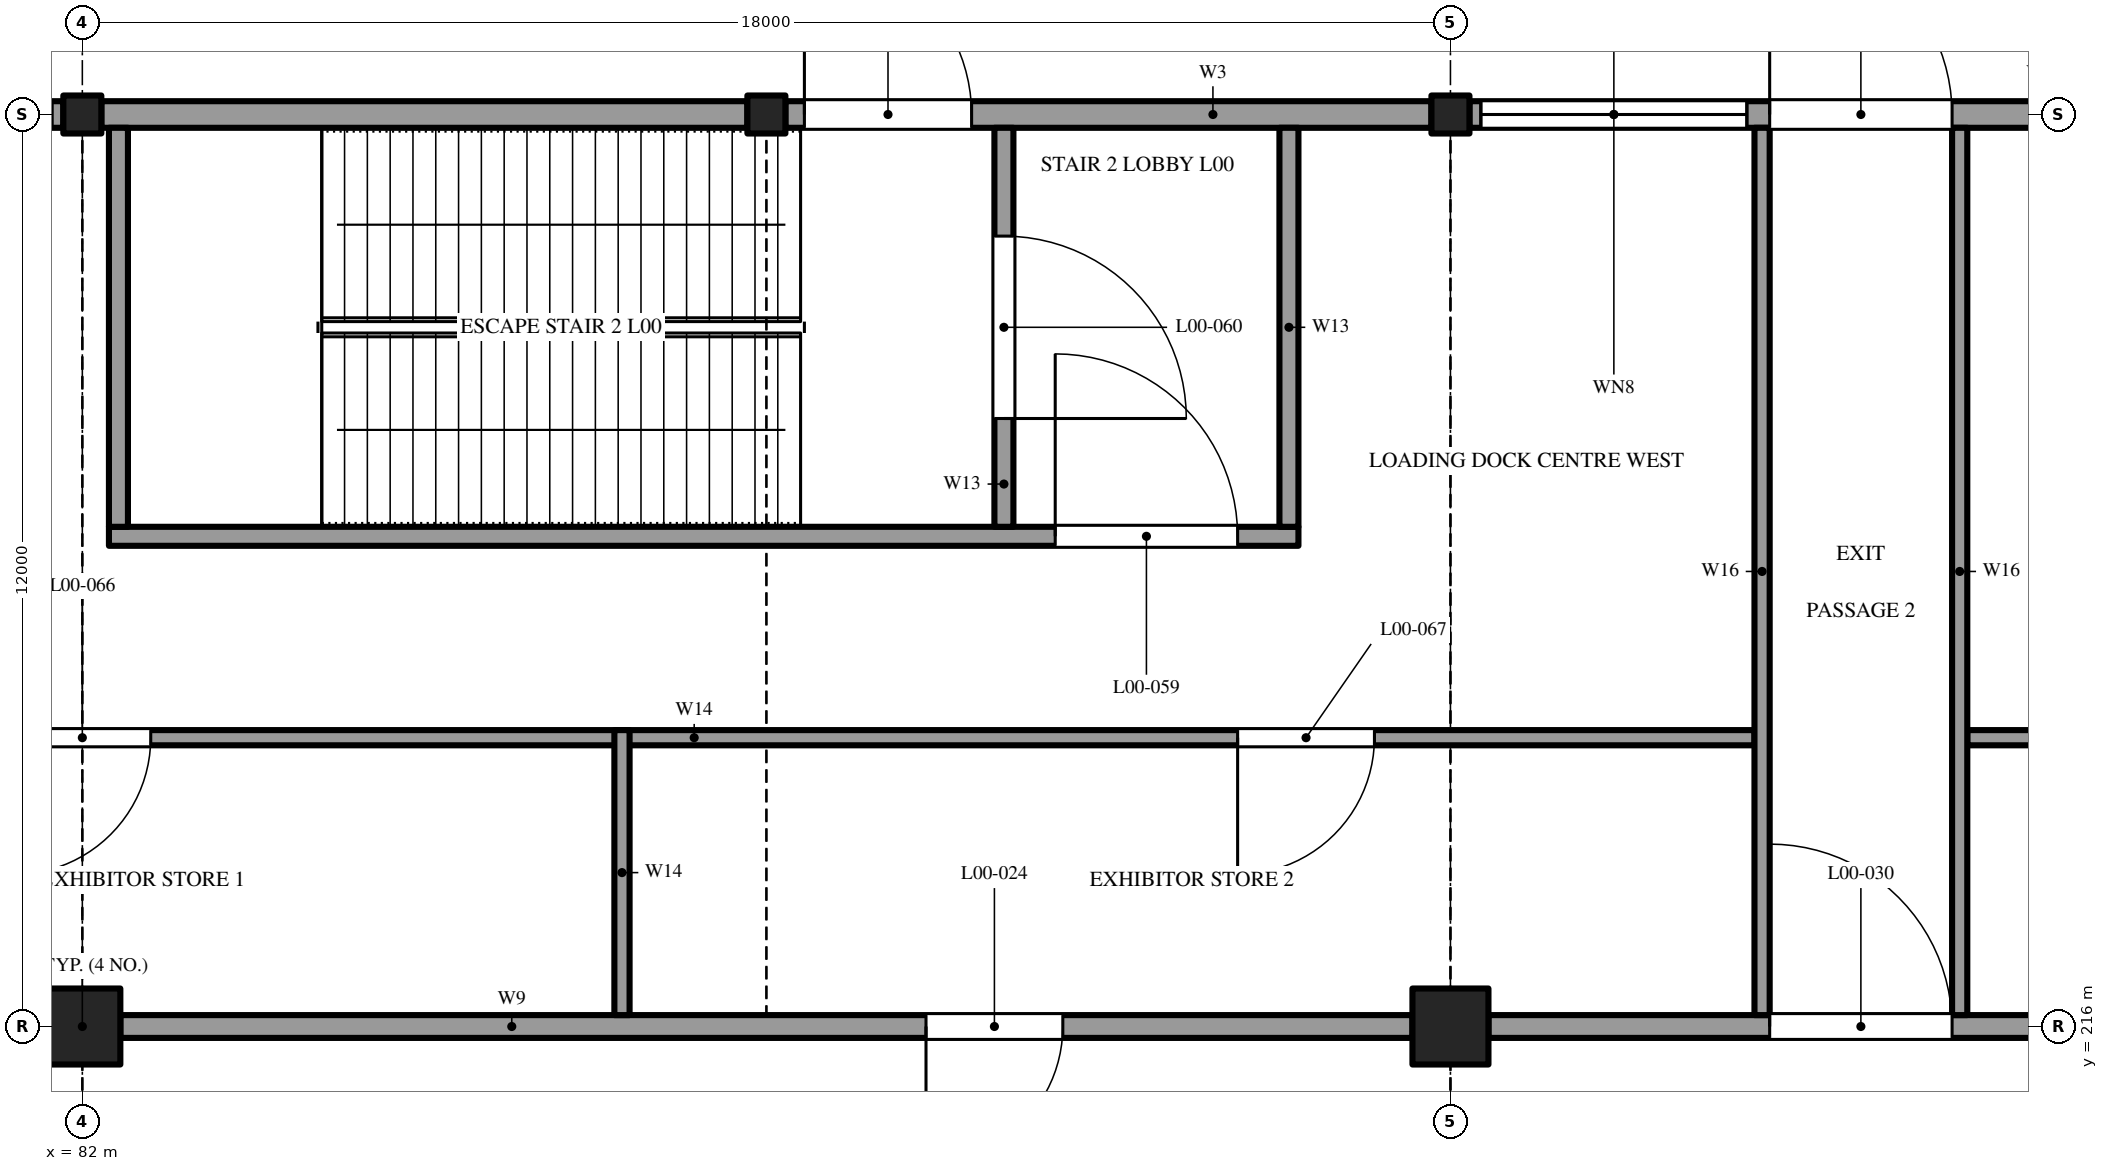
"""IFC4 building model, lengths in metres.
Left out: names, types, materials, properties, quantities, classifications, styles, units other than length and angle.
Written with IfcOpenShell. Run it as: python <this file> out.ifc"""

import sys

from ifc_helpers import new_model, si_unit, direction, frame, frame_2d, origin, origin_2d, place, context, subcontext, project, spatial, rectangle, extrude, element, fill, save


model = new_model("IFC4")
c1 = context("Model", 3, precision=1e-05, world=origin(), true_north=direction((0.0, 1.0)))
c2 = subcontext(c1, "Body", "Model", "MODEL_VIEW")
j1 = project(units=[si_unit("LENGTHUNIT", "METRE"), si_unit("PLANEANGLEUNIT", "RADIAN")], contexts=[c1])
p1 = place(None, origin())
s1 = spatial("IfcSite", under=j1, at=p1, CompositionType="ELEMENT")
p2 = place(p1, origin())
s2 = spatial("IfcBuilding", under=s1, at=p2, CompositionType="ELEMENT")
p3 = place(p2, origin())
s3 = spatial("IfcBuildingStorey", under=s2, at=p3, CompositionType="ELEMENT", Elevation=0.0)
for number, where, z_axis, x_axis in (
    (1, (82.0, 216.0, -0.4), (0.0, 0.0, 1.0), (1.0, 0.0, 0.0)),
    (2, (100.0, 216.0, -0.4), (0.0, 0.0, 1.0), (1.0, 0.0, 0.0)),
):
    element("IfcColumn", number, at=place(p3, frame(where, z_axis=z_axis, x_axis=x_axis)), inside=s3, PredefinedType="COLUMN", context=c2, shape_type="SweptSolid", body=[
        extrude(rectangle(XDim=1.0, YDim=1.0, at=origin_2d()), origin(), (0.0, 0.0, 1.0), 7.6),
    ])
for number, where, z_axis, x_axis in (
    (3, (82.0, 228.0, -0.4), (0.0, 0.0, 1.0), (1.0, 0.0, 0.0)),
    (4, (91.0, 228.0, -0.4), (0.0, 0.0, 1.0), (1.0, 0.0, 0.0)),
    (5, (100.0, 228.0, -0.4), (0.0, 0.0, 1.0), (1.0, 0.0, 0.0)),
):
    element("IfcColumn", number, at=place(p3, frame(where, z_axis=z_axis, x_axis=x_axis)), inside=s3, PredefinedType="COLUMN", context=c2, shape_type="SweptSolid", body=[
        extrude(rectangle(XDim=0.5, YDim=0.5, at=origin_2d()), origin(), (0.0, 0.0, 1.0), 7.6),
    ])
p4 = place(p3, frame((82.5, 216.0, 0.0), z_axis=(0.0, 0.0, 1.0), x_axis=(1.0, 0.0, 0.0)))
e6 = element("IfcWall", 6, at=p4, inside=s3, PredefinedType="SOLIDWALL", context=c2, shape_type="SweptSolid", body=[
    extrude(rectangle(XDim=17.0, YDim=0.3, at=frame_2d((8.5, 0.0))), origin(), (0.0, 0.0, 1.0), 6.8),
])
p5 = place(p4, frame((10.6, 0.0, 0.0)))
e7 = element("IfcOpeningElement", 7, at=p5, cuts=e6, PredefinedType="OPENING", context=c2, shape_type="SweptSolid", body=[
    extrude(rectangle(XDim=1.8, YDim=2.4, at=frame_2d((0.9, 1.2))), frame((0.0, 0.16, 0.0), z_axis=(0.0, -1.0, 0.0), x_axis=(1.0, 0.0, 0.0)), (0.0, 0.0, 1.0), 0.32),
])
p6 = place(p3, frame((100.5, 216.0, 0.0), z_axis=(0.0, 0.0, 1.0), x_axis=(1.0, 0.0, 0.0)))
e8 = element("IfcWall", 8, at=p6, inside=s3, PredefinedType="SOLIDWALL", context=c2, shape_type="SweptSolid", body=[
    extrude(rectangle(XDim=17.0, YDim=0.3, at=frame_2d((8.5, 0.0))), origin(), (0.0, 0.0, 1.0), 6.8),
])
p7 = place(p6, frame((10.6, 0.0, 0.0)))
e9 = element("IfcOpeningElement", 9, at=p7, cuts=e8, PredefinedType="OPENING", context=c2, shape_type="SweptSolid", body=[
    extrude(rectangle(XDim=1.8, YDim=2.4, at=frame_2d((0.9, 1.2))), frame((0.0, 0.16, 0.0), z_axis=(0.0, -1.0, 0.0), x_axis=(1.0, 0.0, 0.0)), (0.0, 0.0, 1.0), 0.32),
])
p8 = place(p6, frame((3.7, 0.0, 0.0)))
e10 = element("IfcOpeningElement", 10, at=p8, cuts=e8, PredefinedType="OPENING", context=c2, shape_type="SweptSolid", body=[
    extrude(rectangle(XDim=2.4, YDim=2.4, at=frame_2d((1.2, 1.2))), frame((0.0, 0.16, 0.0), z_axis=(0.0, -1.0, 0.0), x_axis=(1.0, 0.0, 0.0)), (0.0, 0.0, 1.0), 0.32),
])
p9 = place(p3, frame((73.25, 228.0, 0.0), z_axis=(0.0, 0.0, 1.0), x_axis=(1.0, 0.0, 0.0)))
e11 = element("IfcWall", 11, at=p9, inside=s3, PredefinedType="SOLIDWALL", context=c2, shape_type="SweptSolid", body=[
    extrude(rectangle(XDim=8.5, YDim=0.35, at=frame_2d((4.25, 0.0))), origin(), (0.0, 0.0, 1.0), 6.8),
])
p10 = place(p9, frame((4.85, 0.0, 0.0)))
e12 = element("IfcOpeningElement", 12, at=p10, cuts=e11, PredefinedType="OPENING", context=c2, shape_type="SweptSolid", body=[
    extrude(rectangle(XDim=3.5, YDim=4.2, at=frame_2d((1.75, 2.1))), frame((0.0, 0.185, 0.0), z_axis=(0.0, -1.0, 0.0), x_axis=(1.0, 0.0, 0.0)), (0.0, 0.0, 1.0), 0.37),
])
p11 = place(p9, frame((4.85, 0.0, 4.9)))
e13 = element("IfcOpeningElement", 13, at=p11, cuts=e11, PredefinedType="OPENING", context=c2, shape_type="SweptSolid", body=[
    extrude(rectangle(XDim=3.5, YDim=1.7, at=frame_2d((1.75, 0.85))), frame((0.0, 0.185, 0.0), z_axis=(0.0, -1.0, 0.0), x_axis=(1.0, 0.0, 0.0)), (0.0, 0.0, 1.0), 0.37),
])
p12 = place(p9, frame((0.75, 0.0, 0.0)))
e14 = element("IfcOpeningElement", 14, at=p12, cuts=e11, PredefinedType="OPENING", context=c2, shape_type="SweptSolid", body=[
    extrude(rectangle(XDim=2.4, YDim=2.2, at=frame_2d((1.2, 1.1))), frame((0.0, 0.185, 0.0), z_axis=(0.0, -1.0, 0.0), x_axis=(1.0, 0.0, 0.0)), (0.0, 0.0, 1.0), 0.37),
])
p13 = place(p3, frame((82.25, 228.0, 0.0), z_axis=(0.0, 0.0, 1.0), x_axis=(1.0, 0.0, 0.0)))
e15 = element("IfcWall", 15, at=p13, inside=s3, PredefinedType="SOLIDWALL", context=c2, shape_type="SweptSolid", body=[
    extrude(rectangle(XDim=8.5, YDim=0.35, at=frame_2d((4.25, 0.0))), origin(), (0.0, 0.0, 1.0), 6.8),
])
p14 = place(p3, frame((91.25, 228.0, 0.0), z_axis=(0.0, 0.0, 1.0), x_axis=(1.0, 0.0, 0.0)))
e16 = element("IfcWall", 16, at=p14, inside=s3, PredefinedType="SOLIDWALL", context=c2, shape_type="SweptSolid", body=[
    extrude(rectangle(XDim=8.5, YDim=0.35, at=frame_2d((4.25, 0.0))), origin(), (0.0, 0.0, 1.0), 6.8),
])
p15 = place(p14, frame((0.25, 0.0, 0.0)))
e17 = element("IfcOpeningElement", 17, at=p15, cuts=e16, PredefinedType="OPENING", context=c2, shape_type="SweptSolid", body=[
    extrude(rectangle(XDim=2.2, YDim=2.2, at=frame_2d((1.1, 1.1))), frame((0.0, 0.185, 0.0), z_axis=(0.0, -1.0, 0.0), x_axis=(1.0, 0.0, 0.0)), (0.0, 0.0, 1.0), 0.37),
])
p16 = place(p3, frame((100.25, 228.0, 0.0), z_axis=(0.0, 0.0, 1.0), x_axis=(1.0, 0.0, 0.0)))
e18 = element("IfcWall", 18, at=p16, inside=s3, PredefinedType="SOLIDWALL", context=c2, shape_type="SweptSolid", body=[
    extrude(rectangle(XDim=8.5, YDim=0.35, at=frame_2d((4.25, 0.0))), origin(), (0.0, 0.0, 1.0), 6.8),
])
p17 = place(p16, frame((0.15, 0.0, 0.0)))
e19 = element("IfcOpeningElement", 19, at=p17, cuts=e18, PredefinedType="OPENING", context=c2, shape_type="SweptSolid", body=[
    extrude(rectangle(XDim=3.5, YDim=4.2, at=frame_2d((1.75, 2.1))), frame((0.0, 0.185, 0.0), z_axis=(0.0, -1.0, 0.0), x_axis=(1.0, 0.0, 0.0)), (0.0, 0.0, 1.0), 0.37),
])
p18 = place(p16, frame((0.15, 0.0, 4.9)))
e20 = element("IfcOpeningElement", 20, at=p18, cuts=e18, PredefinedType="OPENING", context=c2, shape_type="SweptSolid", body=[
    extrude(rectangle(XDim=3.5, YDim=1.7, at=frame_2d((1.75, 0.85))), frame((0.0, 0.185, 0.0), z_axis=(0.0, -1.0, 0.0), x_axis=(1.0, 0.0, 0.0)), (0.0, 0.0, 1.0), 0.37),
])
p19 = place(p16, frame((3.95, 0.0, 0.0)))
e21 = element("IfcOpeningElement", 21, at=p19, cuts=e18, PredefinedType="OPENING", context=c2, shape_type="SweptSolid", body=[
    extrude(rectangle(XDim=2.4, YDim=2.2, at=frame_2d((1.2, 1.1))), frame((0.0, 0.185, 0.0), z_axis=(0.0, -1.0, 0.0), x_axis=(1.0, 0.0, 0.0)), (0.0, 0.0, 1.0), 0.37),
])
p20 = place(p3, frame((82.35, 222.45, 0.0), z_axis=(0.0, 0.0, 1.0), x_axis=(1.0, 0.0, 0.0)))
e22 = element("IfcWall", 22, at=p20, inside=s3, PredefinedType="SOLIDWALL", context=c2, shape_type="SweptSolid", body=[
    extrude(rectangle(XDim=15.65, YDim=0.25, at=frame_2d((7.825, 0.0))), origin(), (0.0, 0.0, 1.0), 6.8),
])
p21 = place(p20, frame((12.45, 0.0, 0.0)))
e23 = element("IfcOpeningElement", 23, at=p21, cuts=e22, PredefinedType="OPENING", context=c2, shape_type="SweptSolid", body=[
    extrude(rectangle(XDim=2.4, YDim=2.2, at=frame_2d((1.2, 1.1))), frame((0.0, 0.135, 0.0), z_axis=(0.0, -1.0, 0.0), x_axis=(1.0, 0.0, 0.0)), (0.0, 0.0, 1.0), 0.27),
])
p22 = place(p3, frame((94.125, 222.575, 0.0), z_axis=(0.0, 0.0, 1.0), x_axis=(0.0, 1.0, 0.0)))
e24 = element("IfcWall", 24, at=p22, inside=s3, PredefinedType="SOLIDWALL", context=c2, shape_type="SweptSolid", body=[
    extrude(rectangle(XDim=5.25, YDim=0.25, at=frame_2d((2.625, 0.0))), origin(), (0.0, 0.0, 1.0), 6.8),
])
p23 = place(p22, frame((1.425, 0.0, 0.0)))
e25 = element("IfcOpeningElement", 25, at=p23, cuts=e24, PredefinedType="OPENING", context=c2, shape_type="SweptSolid", body=[
    extrude(rectangle(XDim=2.4, YDim=2.2, at=frame_2d((1.2, 1.1))), frame((0.0, 0.135, 0.0), z_axis=(0.0, -1.0, 0.0), x_axis=(1.0, 0.0, 0.0)), (0.0, 0.0, 1.0), 0.27),
])
for number, where, z_axis, x_axis in (
    (26, (82.475, 222.575, 0.0), (0.0, 0.0, 1.0), (0.0, 1.0, 0.0)),
    (27, (97.875, 222.575, 0.0), (0.0, 0.0, 1.0), (0.0, 1.0, 0.0)),
):
    element("IfcWall", number, at=place(p3, frame(where, z_axis=z_axis, x_axis=x_axis)), inside=s3, PredefinedType="SOLIDWALL", context=c2, shape_type="SweptSolid", body=[
        extrude(rectangle(XDim=5.25, YDim=0.25, at=frame_2d((2.625, 0.0))), origin(), (0.0, 0.0, 1.0), 6.8),
    ])
p24 = place(p3, frame((76.6, 219.8, 0.0), z_axis=(0.0, 0.0, 1.0), x_axis=(1.0, 0.0, 0.0)))
e28 = element("IfcWall", 28, at=p24, inside=s3, PredefinedType="SOLIDWALL", context=c2, shape_type="SweptSolid", body=[
    extrude(rectangle(XDim=27.4, YDim=0.2, at=frame_2d((13.7, 0.0))), origin(), (0.0, 0.0, 1.0), 6.8),
])
p25 = place(p24, frame((4.5, 0.0, 0.0)))
e29 = element("IfcOpeningElement", 29, at=p25, cuts=e28, PredefinedType="OPENING", context=c2, shape_type="SweptSolid", body=[
    extrude(rectangle(XDim=1.8, YDim=2.4, at=frame_2d((0.9, 1.2))), frame((0.0, 0.11, 0.0), z_axis=(0.0, -1.0, 0.0), x_axis=(1.0, 0.0, 0.0)), (0.0, 0.0, 1.0), 0.22),
])
p26 = place(p24, frame((20.6, 0.0, 0.0)))
e30 = element("IfcOpeningElement", 30, at=p26, cuts=e28, PredefinedType="OPENING", context=c2, shape_type="SweptSolid", body=[
    extrude(rectangle(XDim=1.8, YDim=2.4, at=frame_2d((0.9, 1.2))), frame((0.0, 0.11, 0.0), z_axis=(0.0, -1.0, 0.0), x_axis=(1.0, 0.0, 0.0)), (0.0, 0.0, 1.0), 0.22),
])
p27 = place(p3, frame((106.8, 219.8, 0.0), z_axis=(0.0, 0.0, 1.0), x_axis=(1.0, 0.0, 0.0)))
e31 = element("IfcWall", 31, at=p27, inside=s3, PredefinedType="SOLIDWALL", context=c2, shape_type="SweptSolid", body=[
    extrude(rectangle(XDim=12.5, YDim=0.2, at=frame_2d((6.25, 0.0))), origin(), (0.0, 0.0, 1.0), 6.8),
])
p28 = place(p27, frame((5.55, 0.0, 0.0)))
e32 = element("IfcOpeningElement", 32, at=p28, cuts=e31, PredefinedType="OPENING", context=c2, shape_type="SweptSolid", body=[
    extrude(rectangle(XDim=1.8, YDim=2.4, at=frame_2d((0.9, 1.2))), frame((0.0, 0.11, 0.0), z_axis=(0.0, -1.0, 0.0), x_axis=(1.0, 0.0, 0.0)), (0.0, 0.0, 1.0), 0.22),
])
p29 = place(p3, frame((89.1, 216.15, 0.0), z_axis=(0.0, 0.0, 1.0), x_axis=(0.0, 1.0, 0.0)))
e33 = element("IfcWall", 33, at=p29, inside=s3, PredefinedType="SOLIDWALL", context=c2, shape_type="SweptSolid", body=[
    extrude(rectangle(XDim=3.75, YDim=0.2, at=frame_2d((1.875, 0.0))), origin(), (0.0, 0.0, 1.0), 6.8),
])
for number, where, z_axis, x_axis in (
    (34, (104.1, 216.15, 0.0), (0.0, 0.0, 1.0), (0.0, 1.0, 0.0)),
    (35, (106.7, 216.15, 0.0), (0.0, 0.0, 1.0), (0.0, 1.0, 0.0)),
):
    element("IfcWall", number, at=place(p3, frame(where, z_axis=z_axis, x_axis=x_axis)), inside=s3, PredefinedType="SOLIDWALL", context=c2, shape_type="SweptSolid", body=[
        extrude(rectangle(XDim=11.675, YDim=0.2, at=frame_2d((5.837, 0.0))), origin(), (0.0, 0.0, 1.0), 6.8),
    ])
p30 = place(p5, frame((1.8, 0.0, 0.0), z_axis=(0.0, 0.0, 1.0), x_axis=(-1.0, 0.0, 0.0)))
e36 = element("IfcDoor", 36, at=p30, inside=s3, OperationType="DOUBLE_DOOR_SINGLE_SWING", PredefinedType="DOOR", context=c2, shape_type="SweptSolid", body=[
    extrude(rectangle(XDim=1.8, YDim=2.4, at=frame_2d((0.9, 1.2))), frame((0.0, 0.025, 0.0), z_axis=(0.0, -1.0, 0.0), x_axis=(1.0, 0.0, 0.0)), (0.0, 0.0, 1.0), 0.05),
])
fill(e7, e36)
p31 = place(p8, origin())
e37 = element("IfcDoor", 37, at=p31, inside=s3, OperationType="DOUBLE_DOOR_SINGLE_SWING", PredefinedType="DOOR", context=c2, shape_type="SweptSolid", body=[
    extrude(rectangle(XDim=2.4, YDim=2.4, at=frame_2d((1.2, 1.2))), frame((0.0, 0.025, 0.0), z_axis=(0.0, -1.0, 0.0), x_axis=(1.0, 0.0, 0.0)), (0.0, 0.0, 1.0), 0.05),
])
fill(e10, e37)
p32 = place(p17, origin())
e38 = element("IfcDoor", 38, at=p32, inside=s3, OperationType="ROLLINGUP", PredefinedType="DOOR", context=c2, shape_type="SweptSolid", body=[
    extrude(rectangle(XDim=3.5, YDim=4.2, at=frame_2d((1.75, 2.1))), frame((0.0, 0.025, 0.0), z_axis=(0.0, -1.0, 0.0), x_axis=(1.0, 0.0, 0.0)), (0.0, 0.0, 1.0), 0.05),
])
fill(e19, e38)
p33 = place(p18, origin())
e39 = element("IfcWindow", 39, at=p33, inside=s3, PartitioningType="SINGLE_PANEL", PredefinedType="WINDOW", context=c2, shape_type="SweptSolid", body=[
    extrude(rectangle(XDim=3.5, YDim=1.7, at=frame_2d((1.75, 0.85))), frame((0.0, 0.03, 0.0), z_axis=(0.0, -1.0, 0.0), x_axis=(1.0, 0.0, 0.0)), (0.0, 0.0, 1.0), 0.06),
])
fill(e20, e39)
p34 = place(p15, origin())
e40 = element("IfcDoor", 40, at=p34, inside=s3, OperationType="DOUBLE_DOOR_SINGLE_SWING", PredefinedType="DOOR", context=c2, shape_type="SweptSolid", body=[
    extrude(rectangle(XDim=2.2, YDim=2.2, at=frame_2d((1.1, 1.1))), frame((0.0, 0.025, 0.0), z_axis=(0.0, -1.0, 0.0), x_axis=(1.0, 0.0, 0.0)), (0.0, 0.0, 1.0), 0.05),
])
fill(e17, e40)
p35 = place(p19, origin())
e41 = element("IfcDoor", 41, at=p35, inside=s3, OperationType="DOUBLE_DOOR_SINGLE_SWING", PredefinedType="DOOR", context=c2, shape_type="SweptSolid", body=[
    extrude(rectangle(XDim=2.4, YDim=2.2, at=frame_2d((1.2, 1.1))), frame((0.0, 0.025, 0.0), z_axis=(0.0, -1.0, 0.0), x_axis=(1.0, 0.0, 0.0)), (0.0, 0.0, 1.0), 0.05),
])
fill(e21, e41)
p36 = place(p21, origin())
e42 = element("IfcDoor", 42, at=p36, inside=s3, OperationType="DOUBLE_DOOR_SINGLE_SWING", PredefinedType="DOOR", context=c2, shape_type="SweptSolid", body=[
    extrude(rectangle(XDim=2.4, YDim=2.2, at=frame_2d((1.2, 1.1))), frame((0.0, 0.025, 0.0), z_axis=(0.0, -1.0, 0.0), x_axis=(1.0, 0.0, 0.0)), (0.0, 0.0, 1.0), 0.05),
])
fill(e23, e42)
p37 = place(p23, frame((2.4, 0.0, 0.0), z_axis=(0.0, 0.0, 1.0), x_axis=(-1.0, 0.0, 0.0)))
e43 = element("IfcDoor", 43, at=p37, inside=s3, OperationType="DOUBLE_DOOR_SINGLE_SWING", PredefinedType="DOOR", context=c2, shape_type="SweptSolid", body=[
    extrude(rectangle(XDim=2.4, YDim=2.2, at=frame_2d((1.2, 1.1))), frame((0.0, 0.025, 0.0), z_axis=(0.0, -1.0, 0.0), x_axis=(1.0, 0.0, 0.0)), (0.0, 0.0, 1.0), 0.05),
])
fill(e25, e43)
p38 = place(p25, frame((1.8, 0.0, 0.0), z_axis=(0.0, 0.0, 1.0), x_axis=(-1.0, 0.0, 0.0)))
e44 = element("IfcDoor", 44, at=p38, inside=s3, OperationType="DOUBLE_DOOR_SINGLE_SWING", PredefinedType="DOOR", context=c2, shape_type="SweptSolid", body=[
    extrude(rectangle(XDim=1.8, YDim=2.4, at=frame_2d((0.9, 1.2))), frame((0.0, 0.025, 0.0), z_axis=(0.0, -1.0, 0.0), x_axis=(1.0, 0.0, 0.0)), (0.0, 0.0, 1.0), 0.05),
])
fill(e29, e44)
p39 = place(p26, frame((1.8, 0.0, 0.0), z_axis=(0.0, 0.0, 1.0), x_axis=(-1.0, 0.0, 0.0)))
e45 = element("IfcDoor", 45, at=p39, inside=s3, OperationType="DOUBLE_DOOR_SINGLE_SWING", PredefinedType="DOOR", context=c2, shape_type="SweptSolid", body=[
    extrude(rectangle(XDim=1.8, YDim=2.4, at=frame_2d((0.9, 1.2))), frame((0.0, 0.025, 0.0), z_axis=(0.0, -1.0, 0.0), x_axis=(1.0, 0.0, 0.0)), (0.0, 0.0, 1.0), 0.05),
])
fill(e30, e45)
save(model, sys.argv[1])
